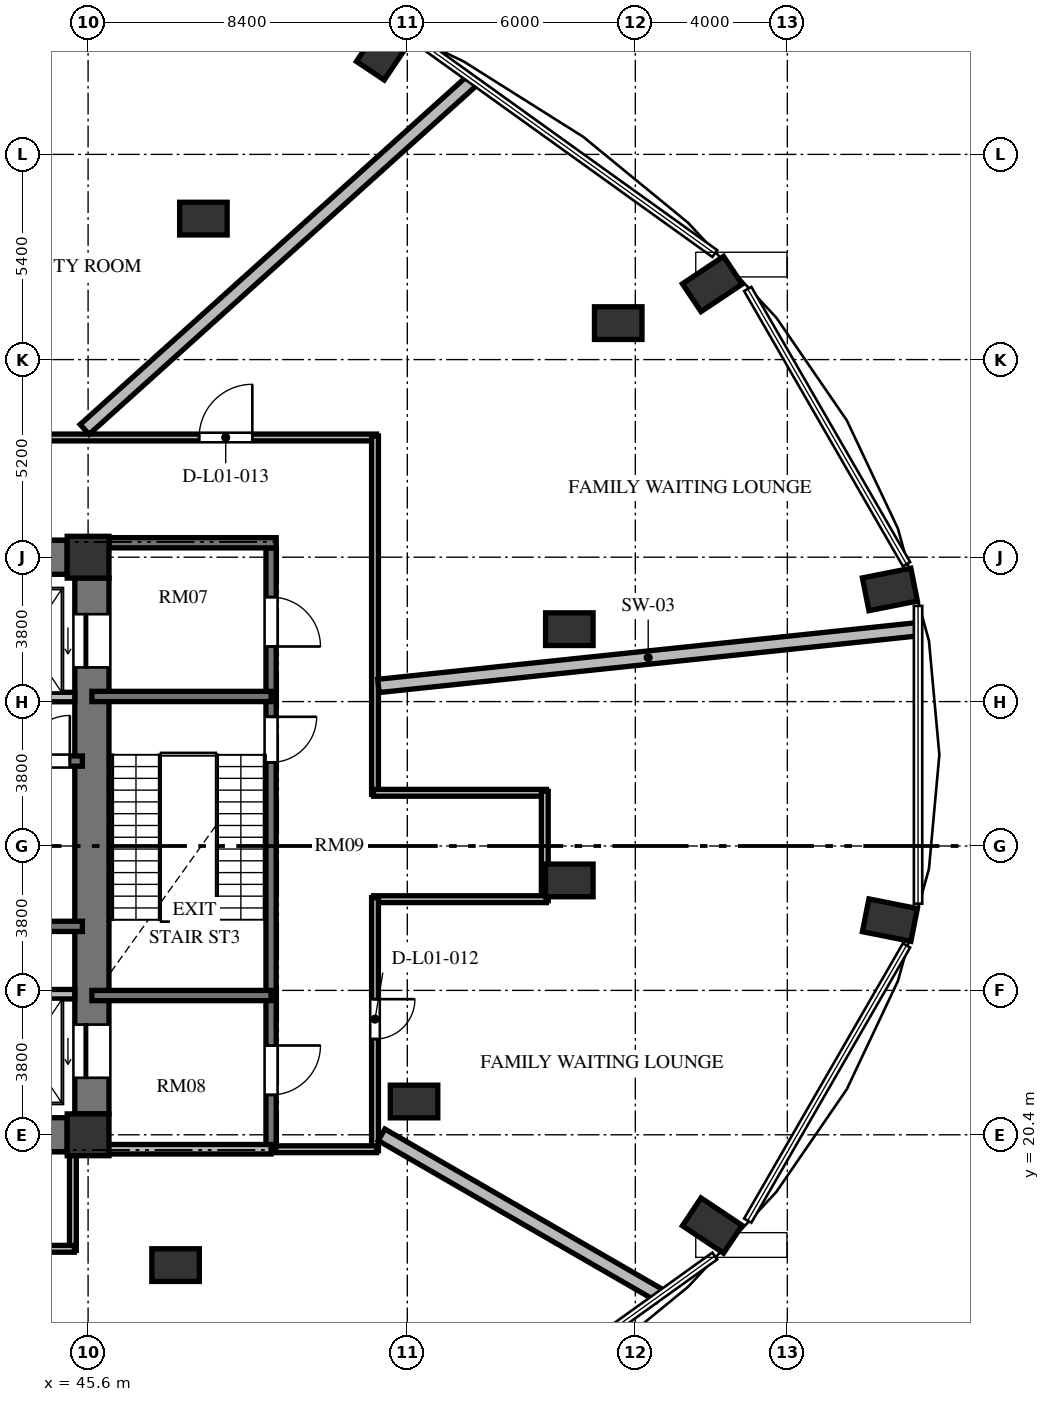
"""IFC4 building model, lengths in metres.
Left out: names, types, materials, properties, quantities, classifications, styles, units other than length and angle.
Written with IfcOpenShell. Run it as: python <this file> out.ifc"""

import sys

from ifc_helpers import new_model, si_unit, direction, frame, frame_2d, origin, origin_2d, place, context, subcontext, project, spatial, rectangle, extrude, element, fill, save


model = new_model("IFC4")
c1 = context("Model", 3, precision=1e-05, world=origin(), true_north=direction((0.0, 1.0)))
c2 = subcontext(c1, "Body", "Model", "MODEL_VIEW")
j1 = project(units=[si_unit("LENGTHUNIT", "METRE"), si_unit("PLANEANGLEUNIT", "RADIAN")], contexts=[c1])
p1 = place(None, origin())
s1 = spatial("IfcSite", under=j1, at=p1, CompositionType="ELEMENT")
p2 = place(p1, origin())
s2 = spatial("IfcBuilding", under=s1, at=p2, CompositionType="ELEMENT")
p3 = place(p2, frame((0.0, 0.0, 6.0)))
s3 = spatial("IfcBuildingStorey", under=s2, at=p3, CompositionType="ELEMENT", Elevation=6.0)
for number, where, z_axis, x_axis in (
    (1, (62.025, 18.011, 0.0), (0.0, 0.0, 1.0), (0.831, -0.556, 0.0)),
    (2, (66.698, 26.05, 0.0), (0.0, 0.0, 1.0), (0.981, -0.195, 0.0)),
    (3, (66.698, 34.75, 0.0), (0.0, 0.0, 1.0), (0.981, 0.195, 0.0)),
    (4, (62.025, 42.789, 0.0), (0.0, 0.0, 1.0), (0.831, 0.556, 0.0)),
    (5, (53.389, 48.942, 0.0), (0.0, 0.0, 1.0), (0.556, 0.831, 0.0)),
):
    element("IfcColumn", number, at=place(p3, frame(where, z_axis=z_axis, x_axis=x_axis)), inside=s3, PredefinedType="COLUMN", context=c2, shape_type="SweptSolid", body=[
        extrude(rectangle(XDim=1.3, YDim=0.88, at=origin_2d()), origin(), (0.0, 0.0, 1.0), 4.8),
    ])
for number, where, z_axis, x_axis in (
    (6, (45.6, 20.4, 0.0), (0.0, 0.0, 1.0), (1.0, 0.0, 0.0)),
    (7, (45.6, 35.6, 0.0), (0.0, 0.0, 1.0), (1.0, 0.0, 0.0)),
):
    element("IfcColumn", number, at=place(p3, frame(where, z_axis=z_axis, x_axis=x_axis)), inside=s3, PredefinedType="COLUMN", context=c2, shape_type="SweptSolid", body=[
        extrude(rectangle(XDim=1.1, YDim=1.1, at=origin_2d()), origin(), (0.0, 0.0, 1.0), 4.8),
    ])
for number, where, z_axis, x_axis in (
    (8, (47.902, 16.971, 0.0), (0.0, 0.0, 1.0), (1.0, 0.0, 0.0)),
    (9, (54.177, 21.276, 0.0), (0.0, 0.0, 1.0), (1.0, 0.0, 0.0)),
    (10, (58.263, 27.094, 0.0), (0.0, 0.0, 1.0), (1.0, 0.0, 0.0)),
    (11, (58.263, 33.706, 0.0), (0.0, 0.0, 1.0), (1.0, 0.0, 0.0)),
    (12, (59.55, 41.76, 0.0), (0.0, 0.0, 1.0), (1.0, 0.0, 0.0)),
    (13, (48.634, 44.51, 0.0), (0.0, 0.0, 1.0), (1.0, 0.0, 0.0)),
):
    element("IfcColumn", number, at=place(p3, frame(where, z_axis=z_axis, x_axis=x_axis)), inside=s3, PredefinedType="COLUMN", context=c2, shape_type="SweptSolid", body=[
        extrude(rectangle(XDim=1.25, YDim=0.86, at=origin_2d()), origin(), (0.0, 0.0, 1.0), 4.8),
    ])
p4 = place(p3, frame((45.7, 20.95, 0.0), z_axis=(0.0, 0.0, 1.0), x_axis=(0.0, 1.0, 0.0)))
e14 = element("IfcWall", 14, at=p4, inside=s3, PredefinedType="SHEAR", context=c2, shape_type="SweptSolid", body=[
    extrude(rectangle(XDim=14.1, YDim=0.9, at=frame_2d((7.05, 0.0))), origin(), (0.0, 0.0, 1.0), 4.8),
])
p5 = place(p4, frame((11.75, 0.0, 0.0)))
e15 = element("IfcOpeningElement", 15, at=p5, cuts=e14, PredefinedType="OPENING", context=c2, shape_type="SweptSolid", body=[
    extrude(rectangle(XDim=1.4, YDim=2.3, at=frame_2d((0.7, 1.15))), frame((0.0, 0.46, 0.0), z_axis=(0.0, -1.0, 0.0), x_axis=(1.0, 0.0, 0.0)), (0.0, 0.0, 1.0), 0.92),
])
p6 = place(p4, frame((0.95, 0.0, 0.0)))
e16 = element("IfcOpeningElement", 16, at=p6, cuts=e14, PredefinedType="OPENING", context=c2, shape_type="SweptSolid", body=[
    extrude(rectangle(XDim=1.4, YDim=2.3, at=frame_2d((0.7, 1.15))), frame((0.0, 0.46, 0.0), z_axis=(0.0, -1.0, 0.0), x_axis=(1.0, 0.0, 0.0)), (0.0, 0.0, 1.0), 0.92),
])
for number, where, z_axis, x_axis in (
    (17, (39.75, 20.4, 0.0), (0.0, 0.0, 1.0), (1.0, 0.0, 0.0)),
    (18, (39.75, 35.6, 0.0), (0.0, 0.0, 1.0), (1.0, 0.0, 0.0)),
):
    element("IfcWall", number, at=place(p3, frame(where, z_axis=z_axis, x_axis=x_axis)), inside=s3, PredefinedType="SHEAR", context=c2, shape_type="SweptSolid", body=[
        extrude(rectangle(XDim=5.3, YDim=0.9, at=frame_2d((2.65, 0.0))), origin(), (0.0, 0.0, 1.0), 4.8),
    ])
p7 = place(p3, frame((37.465, 30.235, 0.0), z_axis=(0.0, 0.0, 1.0), x_axis=(1.0, 0.0, 0.0)))
e19 = element("IfcWall", 19, at=p7, inside=s3, PredefinedType="SHEAR", context=c2, shape_type="SweptSolid", body=[
    extrude(rectangle(XDim=7.985, YDim=0.27, at=frame_2d((3.992, 0.0))), origin(), (0.0, 0.0, 1.0), 4.8),
])
p8 = place(p7, frame((6.455, 0.0, 0.0)))
e20 = element("IfcOpeningElement", 20, at=p8, cuts=e19, PredefinedType="OPENING", context=c2, shape_type="SweptSolid", body=[
    extrude(rectangle(XDim=1.2, YDim=2.15, at=frame_2d((0.6, 1.075))), frame((0.0, 0.145, 0.0), z_axis=(0.0, -1.0, 0.0), x_axis=(1.0, 0.0, 0.0)), (0.0, 0.0, 1.0), 0.29),
])
p9 = place(p3, frame((37.465, 25.885, 0.0), z_axis=(0.0, 0.0, 1.0), x_axis=(1.0, 0.0, 0.0)))
e21 = element("IfcWall", 21, at=p9, inside=s3, PredefinedType="SHEAR", context=c2, shape_type="SweptSolid", body=[
    extrude(rectangle(XDim=7.985, YDim=0.27, at=frame_2d((3.992, 0.0))), origin(), (0.0, 0.0, 1.0), 4.8),
])
for number, where, z_axis, x_axis in (
    (22, (42.95, 31.92, 0.0), (0.0, 0.0, 1.0), (1.0, 0.0, 0.0)),
    (23, (42.95, 24.1, 0.0), (0.0, 0.0, 1.0), (1.0, 0.0, 0.0)),
):
    element("IfcWall", number, at=place(p3, frame(where, z_axis=z_axis, x_axis=x_axis)), inside=s3, PredefinedType="SOLIDWALL", context=c2, shape_type="SweptSolid", body=[
        extrude(rectangle(XDim=2.3, YDim=0.25, at=frame_2d((1.15, 0.0))), origin(), (0.0, 0.0, 1.0), 4.52),
    ])
p10 = place(p3, frame((50.415, 35.845, 0.0), z_axis=(0.0, 0.0, 1.0), x_axis=(0.0, -1.0, 0.0)))
e24 = element("IfcWall", 24, at=p10, inside=s3, PredefinedType="SHEAR", context=c2, shape_type="SweptSolid", body=[
    extrude(rectangle(XDim=15.825, YDim=0.27, at=frame_2d((7.913, 0.0))), origin(), (0.0, 0.0, 1.0), 4.8),
])
p11 = place(p10, frame((4.445, 0.0, 0.0)))
e25 = element("IfcOpeningElement", 25, at=p11, cuts=e24, PredefinedType="OPENING", context=c2, shape_type="SweptSolid", body=[
    extrude(rectangle(XDim=1.2, YDim=2.15, at=frame_2d((0.6, 1.075))), frame((0.0, 0.145, 0.0), z_axis=(0.0, -1.0, 0.0), x_axis=(1.0, 0.0, 0.0)), (0.0, 0.0, 1.0), 0.29),
])
p12 = place(p10, frame((1.295, 0.0, 0.0)))
e26 = element("IfcOpeningElement", 26, at=p12, cuts=e24, PredefinedType="OPENING", context=c2, shape_type="SweptSolid", body=[
    extrude(rectangle(XDim=1.3, YDim=2.2, at=frame_2d((0.65, 1.1))), frame((0.0, 0.145, 0.0), z_axis=(0.0, -1.0, 0.0), x_axis=(1.0, 0.0, 0.0)), (0.0, 0.0, 1.0), 0.29),
])
p13 = place(p10, frame((13.095, 0.0, 0.0)))
e27 = element("IfcOpeningElement", 27, at=p13, cuts=e24, PredefinedType="OPENING", context=c2, shape_type="SweptSolid", body=[
    extrude(rectangle(XDim=1.3, YDim=2.2, at=frame_2d((0.65, 1.1))), frame((0.0, 0.145, 0.0), z_axis=(0.0, -1.0, 0.0), x_axis=(1.0, 0.0, 0.0)), (0.0, 0.0, 1.0), 0.29),
])
p14 = place(p3, frame((46.15, 35.98, 0.0), z_axis=(0.0, 0.0, 1.0), x_axis=(1.0, 0.0, 0.0)))
e28 = element("IfcWall", 28, at=p14, inside=s3, PredefinedType="SHEAR", context=c2, shape_type="SweptSolid", body=[
    extrude(rectangle(XDim=4.4, YDim=0.27, at=frame_2d((2.2, 0.0))), origin(), (0.0, 0.0, 1.0), 4.8),
])
for number, where, z_axis, x_axis in (
    (29, (45.7, 31.935, 0.0), (0.0, 0.0, 1.0), (1.0, 0.0, 0.0)),
    (30, (45.7, 24.065, 0.0), (0.0, 0.0, 1.0), (1.0, 0.0, 0.0)),
):
    element("IfcWall", number, at=place(p3, frame(where, z_axis=z_axis, x_axis=x_axis)), inside=s3, PredefinedType="SHEAR", context=c2, shape_type="SweptSolid", body=[
        extrude(rectangle(XDim=4.715, YDim=0.27, at=frame_2d((2.357, 0.0))), origin(), (0.0, 0.0, 1.0), 4.8),
    ])
p15 = place(p3, frame((45.7, 20.02, 0.0), z_axis=(0.0, 0.0, 1.0), x_axis=(1.0, 0.0, 0.0)))
e31 = element("IfcWall", 31, at=p15, inside=s3, PredefinedType="SOLIDWALL", context=c2, shape_type="SweptSolid", body=[
    extrude(rectangle(XDim=4.715, YDim=0.25, at=frame_2d((2.357, 0.0))), origin(), (0.0, 0.0, 1.0), 4.52),
])
p16 = place(p3, frame((23.31, 38.75, 0.0), z_axis=(0.0, 0.0, 1.0), x_axis=(1.0, 0.0, 0.0)))
e32 = element("IfcWall", 32, at=p16, inside=s3, PredefinedType="PARTITIONING", context=c2, shape_type="SweptSolid", body=[
    extrude(rectangle(XDim=29.88, YDim=0.18, at=frame_2d((14.94, 0.0))), origin(), (0.0, 0.0, 1.0), 4.52),
])
p17 = place(p16, frame((25.211, 0.0, 0.0)))
e33 = element("IfcOpeningElement", 33, at=p17, cuts=e32, PredefinedType="OPENING", context=c2, shape_type="SweptSolid", body=[
    extrude(rectangle(XDim=1.4, YDim=2.2, at=frame_2d((0.7, 1.1))), frame((0.0, 0.1, 0.0), z_axis=(0.0, -1.0, 0.0), x_axis=(1.0, 0.0, 0.0)), (0.0, 0.0, 1.0), 0.2),
])
p18 = place(p16, frame((18.158, 0.0, 0.0)))
e34 = element("IfcOpeningElement", 34, at=p18, cuts=e32, PredefinedType="OPENING", context=c2, shape_type="SweptSolid", body=[
    extrude(rectangle(XDim=1.05, YDim=2.15, at=frame_2d((0.525, 1.075))), frame((0.0, 0.1, 0.0), z_axis=(0.0, -1.0, 0.0), x_axis=(1.0, 0.0, 0.0)), (0.0, 0.0, 1.0), 0.2),
])
p19 = place(p16, frame((11.785, 0.0, 0.0)))
e35 = element("IfcOpeningElement", 35, at=p19, cuts=e32, PredefinedType="OPENING", context=c2, shape_type="SweptSolid", body=[
    extrude(rectangle(XDim=1.05, YDim=2.15, at=frame_2d((0.525, 1.075))), frame((0.0, 0.1, 0.0), z_axis=(0.0, -1.0, 0.0), x_axis=(1.0, 0.0, 0.0)), (0.0, 0.0, 1.0), 0.2),
])
p20 = place(p16, frame((7.314, 0.0, 0.0)))
e36 = element("IfcOpeningElement", 36, at=p20, cuts=e32, PredefinedType="OPENING", context=c2, shape_type="SweptSolid", body=[
    extrude(rectangle(XDim=1.4, YDim=2.2, at=frame_2d((0.7, 1.1))), frame((0.0, 0.1, 0.0), z_axis=(0.0, -1.0, 0.0), x_axis=(1.0, 0.0, 0.0)), (0.0, 0.0, 1.0), 0.2),
])
p21 = place(p16, frame((2.832, 0.0, 0.0)))
e37 = element("IfcOpeningElement", 37, at=p21, cuts=e32, PredefinedType="OPENING", context=c2, shape_type="SweptSolid", body=[
    extrude(rectangle(XDim=0.95, YDim=2.1, at=frame_2d((0.475, 1.05))), frame((0.0, 0.1, 0.0), z_axis=(0.0, -1.0, 0.0), x_axis=(1.0, 0.0, 0.0)), (0.0, 0.0, 1.0), 0.2),
])
p22 = place(p3, frame((53.15, 38.79, 0.0), z_axis=(0.0, 0.0, 1.0), x_axis=(0.0, -1.0, 0.0)))
e38 = element("IfcWall", 38, at=p22, inside=s3, PredefinedType="PARTITIONING", context=c2, shape_type="SweptSolid", body=[
    extrude(rectangle(XDim=9.43, YDim=0.18, at=frame_2d((4.715, 0.0))), origin(), (0.0, 0.0, 1.0), 4.205),
])
p23 = place(p3, frame((53.11, 29.4, 0.0), z_axis=(0.0, 0.0, 1.0), x_axis=(1.0, 0.0, 0.0)))
e39 = element("IfcWall", 39, at=p23, inside=s3, PredefinedType="PARTITIONING", context=c2, shape_type="SweptSolid", body=[
    extrude(rectangle(XDim=4.548, YDim=0.18, at=frame_2d((2.274, 0.0))), origin(), (0.0, 0.0, 1.0), 4.52),
])
p24 = place(p3, frame((57.618, 29.44, 0.0), z_axis=(0.0, 0.0, 1.0), x_axis=(0.0, -1.0, 0.0)))
e40 = element("IfcWall", 40, at=p24, inside=s3, PredefinedType="PARTITIONING", context=c2, shape_type="SweptSolid", body=[
    extrude(rectangle(XDim=2.88, YDim=0.18, at=frame_2d((1.44, 0.0))), origin(), (0.0, 0.0, 1.0), 4.52),
])
p25 = place(p3, frame((57.658, 26.6, 0.0), z_axis=(0.0, 0.0, 1.0), x_axis=(-1.0, 0.0, 0.0)))
e41 = element("IfcWall", 41, at=p25, inside=s3, PredefinedType="PARTITIONING", context=c2, shape_type="SweptSolid", body=[
    extrude(rectangle(XDim=4.548, YDim=0.18, at=frame_2d((2.274, 0.0))), origin(), (0.0, 0.0, 1.0), 4.52),
])
p26 = place(p3, frame((53.15, 26.64, 0.0), z_axis=(0.0, 0.0, 1.0), x_axis=(0.0, -1.0, 0.0)))
e42 = element("IfcWall", 42, at=p26, inside=s3, PredefinedType="PARTITIONING", context=c2, shape_type="SweptSolid", body=[
    extrude(rectangle(XDim=6.66, YDim=0.18, at=frame_2d((3.33, 0.0))), origin(), (0.0, 0.0, 1.0), 4.52),
])
p27 = place(p26, frame((2.671, 0.0, 0.0)))
e43 = element("IfcOpeningElement", 43, at=p27, cuts=e42, PredefinedType="OPENING", context=c2, shape_type="SweptSolid", body=[
    extrude(rectangle(XDim=1.05, YDim=2.15, at=frame_2d((0.525, 1.075))), frame((0.0, 0.1, 0.0), z_axis=(0.0, -1.0, 0.0), x_axis=(1.0, 0.0, 0.0)), (0.0, 0.0, 1.0), 0.2),
])
p28 = place(p3, frame((53.19, 20.02, 0.0), z_axis=(0.0, 0.0, 1.0), x_axis=(-1.0, 0.0, 0.0)))
e44 = element("IfcWall", 44, at=p28, inside=s3, PredefinedType="PARTITIONING", context=c2, shape_type="SweptSolid", body=[
    extrude(rectangle(XDim=2.65, YDim=0.18, at=frame_2d((1.325, 0.0))), origin(), (0.0, 0.0, 1.0), 4.52),
])
p29 = place(p3, frame((45.2, 19.91, 0.0), z_axis=(0.0, 0.0, 1.0), x_axis=(0.0, -1.0, 0.0)))
e45 = element("IfcWall", 45, at=p29, inside=s3, PredefinedType="PARTITIONING", context=c2, shape_type="SweptSolid", body=[
    extrude(rectangle(XDim=2.55, YDim=0.18, at=frame_2d((1.275, 0.0))), origin(), (0.0, 0.0, 1.0), 4.52),
])
p30 = place(p3, frame((45.24, 17.4, 0.0), z_axis=(0.0, 0.0, 1.0), x_axis=(-1.0, 0.0, 0.0)))
e46 = element("IfcWall", 46, at=p30, inside=s3, PredefinedType="PARTITIONING", context=c2, shape_type="SweptSolid", body=[
    extrude(rectangle(XDim=21.93, YDim=0.18, at=frame_2d((10.965, 0.0))), origin(), (0.0, 0.0, 1.0), 4.52),
])
p31 = place(p30, frame((14.496, 0.0, 0.0)))
e47 = element("IfcOpeningElement", 47, at=p31, cuts=e46, PredefinedType="OPENING", context=c2, shape_type="SweptSolid", body=[
    extrude(rectangle(XDim=0.95, YDim=2.1, at=frame_2d((0.475, 1.05))), frame((0.0, 0.1, 0.0), z_axis=(0.0, -1.0, 0.0), x_axis=(1.0, 0.0, 0.0)), (0.0, 0.0, 1.0), 0.2),
])
p32 = place(p30, frame((8.49, 0.0, 0.0)))
e48 = element("IfcOpeningElement", 48, at=p32, cuts=e46, PredefinedType="OPENING", context=c2, shape_type="SweptSolid", body=[
    extrude(rectangle(XDim=0.95, YDim=2.1, at=frame_2d((0.475, 1.05))), frame((0.0, 0.1, 0.0), z_axis=(0.0, -1.0, 0.0), x_axis=(1.0, 0.0, 0.0)), (0.0, 0.0, 1.0), 0.2),
])
p33 = place(p30, frame((3.597, 0.0, 0.0)))
e49 = element("IfcOpeningElement", 49, at=p33, cuts=e46, PredefinedType="OPENING", context=c2, shape_type="SweptSolid", body=[
    extrude(rectangle(XDim=0.95, YDim=2.1, at=frame_2d((0.475, 1.05))), frame((0.0, 0.1, 0.0), z_axis=(0.0, -1.0, 0.0), x_axis=(1.0, 0.0, 0.0)), (0.0, 0.0, 1.0), 0.2),
])
p34 = place(p30, frame((1.141, 0.0, 0.0)))
e50 = element("IfcOpeningElement", 50, at=p34, cuts=e46, PredefinedType="OPENING", context=c2, shape_type="SweptSolid", body=[
    extrude(rectangle(XDim=1.4, YDim=2.2, at=frame_2d((0.7, 1.1))), frame((0.0, 0.1, 0.0), z_axis=(0.0, -1.0, 0.0), x_axis=(1.0, 0.0, 0.0)), (0.0, 0.0, 1.0), 0.2),
])
p35 = place(p3, frame((41.847, 17.267, 0.0), z_axis=(0.0, 0.0, 1.0), x_axis=(0.406746917765, -0.913540882987, 0.0)))
e51 = element("IfcWall", 51, at=p35, inside=s3, PredefinedType="PARTITIONING", context=c2, shape_type="SweptSolid", body=[
    extrude(rectangle(XDim=9.231, YDim=0.22, at=frame_2d((4.616, 0.0))), origin(), (0.0, 0.0, 1.0), 4.52),
])
p36 = place(p3, frame((53.322, 20.399, 0.0), z_axis=(0.0, 0.0, 1.0), x_axis=(0.866024398109, -0.500001741877, 0.0)))
e52 = element("IfcWall", 52, at=p36, inside=s3, PredefinedType="SOLIDWALL", context=c2, shape_type="SweptSolid", body=[
    extrude(rectangle(XDim=8.45, YDim=0.35, at=frame_2d((4.225, 0.0))), origin(), (0.0, 0.0, 1.0), 4.52),
])
p37 = place(p3, frame((53.24, 32.212, 0.0), z_axis=(0.0, 0.0, 1.0), x_axis=(0.994522307274, 0.104524544177, 0.0)))
e53 = element("IfcWall", 53, at=p37, inside=s3, PredefinedType="SOLIDWALL", context=c2, shape_type="SweptSolid", body=[
    extrude(rectangle(XDim=14.276, YDim=0.35, at=frame_2d((7.138, 0.0))), origin(), (0.0, 0.0, 1.0), 4.52),
])
p38 = place(p3, frame((45.509, 38.962, 0.0), z_axis=(0.0, 0.0, 1.0), x_axis=(0.743143036481, 0.669132593236, 0.0)))
e54 = element("IfcWall", 54, at=p38, inside=s3, PredefinedType="SOLIDWALL", context=c2, shape_type="SweptSolid", body=[
    extrude(rectangle(XDim=13.739, YDim=0.35, at=frame_2d((6.87, 0.0))), origin(), (0.0, 0.0, 1.0), 4.52),
])
p39 = place(p8, origin())
e55 = element("IfcDoor", 55, at=p39, inside=s3, OperationType="SINGLE_SWING_RIGHT", PredefinedType="DOOR", context=c2, shape_type="SweptSolid", body=[
    extrude(rectangle(XDim=1.2, YDim=2.15, at=frame_2d((0.6, 1.075))), frame((0.0, 0.025, 0.0), z_axis=(0.0, -1.0, 0.0), x_axis=(1.0, 0.0, 0.0)), (0.0, 0.0, 1.0), 0.05),
])
fill(e20, e55)
p40 = place(p5, origin())
e56 = element("IfcDoor", 56, at=p40, inside=s3, OperationType="SLIDING_TO_LEFT", PredefinedType="DOOR", context=c2, shape_type="SweptSolid", body=[
    extrude(rectangle(XDim=1.4, YDim=2.3, at=frame_2d((0.7, 1.15))), frame((0.0, 0.025, 0.0), z_axis=(0.0, -1.0, 0.0), x_axis=(1.0, 0.0, 0.0)), (0.0, 0.0, 1.0), 0.05),
])
fill(e15, e56)
p41 = place(p6, origin())
e57 = element("IfcDoor", 57, at=p41, inside=s3, OperationType="SLIDING_TO_LEFT", PredefinedType="DOOR", context=c2, shape_type="SweptSolid", body=[
    extrude(rectangle(XDim=1.4, YDim=2.3, at=frame_2d((0.7, 1.15))), frame((0.0, 0.025, 0.0), z_axis=(0.0, -1.0, 0.0), x_axis=(1.0, 0.0, 0.0)), (0.0, 0.0, 1.0), 0.05),
])
fill(e16, e57)
p42 = place(p11, origin())
e58 = element("IfcDoor", 58, at=p42, inside=s3, OperationType="SINGLE_SWING_LEFT", PredefinedType="DOOR", context=c2, shape_type="SweptSolid", body=[
    extrude(rectangle(XDim=1.2, YDim=2.15, at=frame_2d((0.6, 1.075))), frame((0.0, 0.025, 0.0), z_axis=(0.0, -1.0, 0.0), x_axis=(1.0, 0.0, 0.0)), (0.0, 0.0, 1.0), 0.05),
])
fill(e25, e58)
p43 = place(p12, origin())
e59 = element("IfcDoor", 59, at=p43, inside=s3, OperationType="SINGLE_SWING_RIGHT", PredefinedType="DOOR", context=c2, shape_type="SweptSolid", body=[
    extrude(rectangle(XDim=1.3, YDim=2.2, at=frame_2d((0.65, 1.1))), frame((0.0, 0.025, 0.0), z_axis=(0.0, -1.0, 0.0), x_axis=(1.0, 0.0, 0.0)), (0.0, 0.0, 1.0), 0.05),
])
fill(e26, e59)
p44 = place(p13, origin())
e60 = element("IfcDoor", 60, at=p44, inside=s3, OperationType="SINGLE_SWING_LEFT", PredefinedType="DOOR", context=c2, shape_type="SweptSolid", body=[
    extrude(rectangle(XDim=1.3, YDim=2.2, at=frame_2d((0.65, 1.1))), frame((0.0, 0.025, 0.0), z_axis=(0.0, -1.0, 0.0), x_axis=(1.0, 0.0, 0.0)), (0.0, 0.0, 1.0), 0.05),
])
fill(e27, e60)
p45 = place(p27, origin())
e61 = element("IfcDoor", 61, at=p45, inside=s3, OperationType="SINGLE_SWING_LEFT", PredefinedType="DOOR", context=c2, shape_type="SweptSolid", body=[
    extrude(rectangle(XDim=1.05, YDim=2.15, at=frame_2d((0.525, 1.075))), frame((0.0, 0.025, 0.0), z_axis=(0.0, -1.0, 0.0), x_axis=(1.0, 0.0, 0.0)), (0.0, 0.0, 1.0), 0.05),
])
fill(e43, e61)
p46 = place(p17, origin())
e62 = element("IfcDoor", 62, at=p46, inside=s3, OperationType="SINGLE_SWING_RIGHT", PredefinedType="DOOR", context=c2, shape_type="SweptSolid", body=[
    extrude(rectangle(XDim=1.4, YDim=2.2, at=frame_2d((0.7, 1.1))), frame((0.0, 0.025, 0.0), z_axis=(0.0, -1.0, 0.0), x_axis=(1.0, 0.0, 0.0)), (0.0, 0.0, 1.0), 0.05),
])
fill(e33, e62)
save(model, sys.argv[1])
